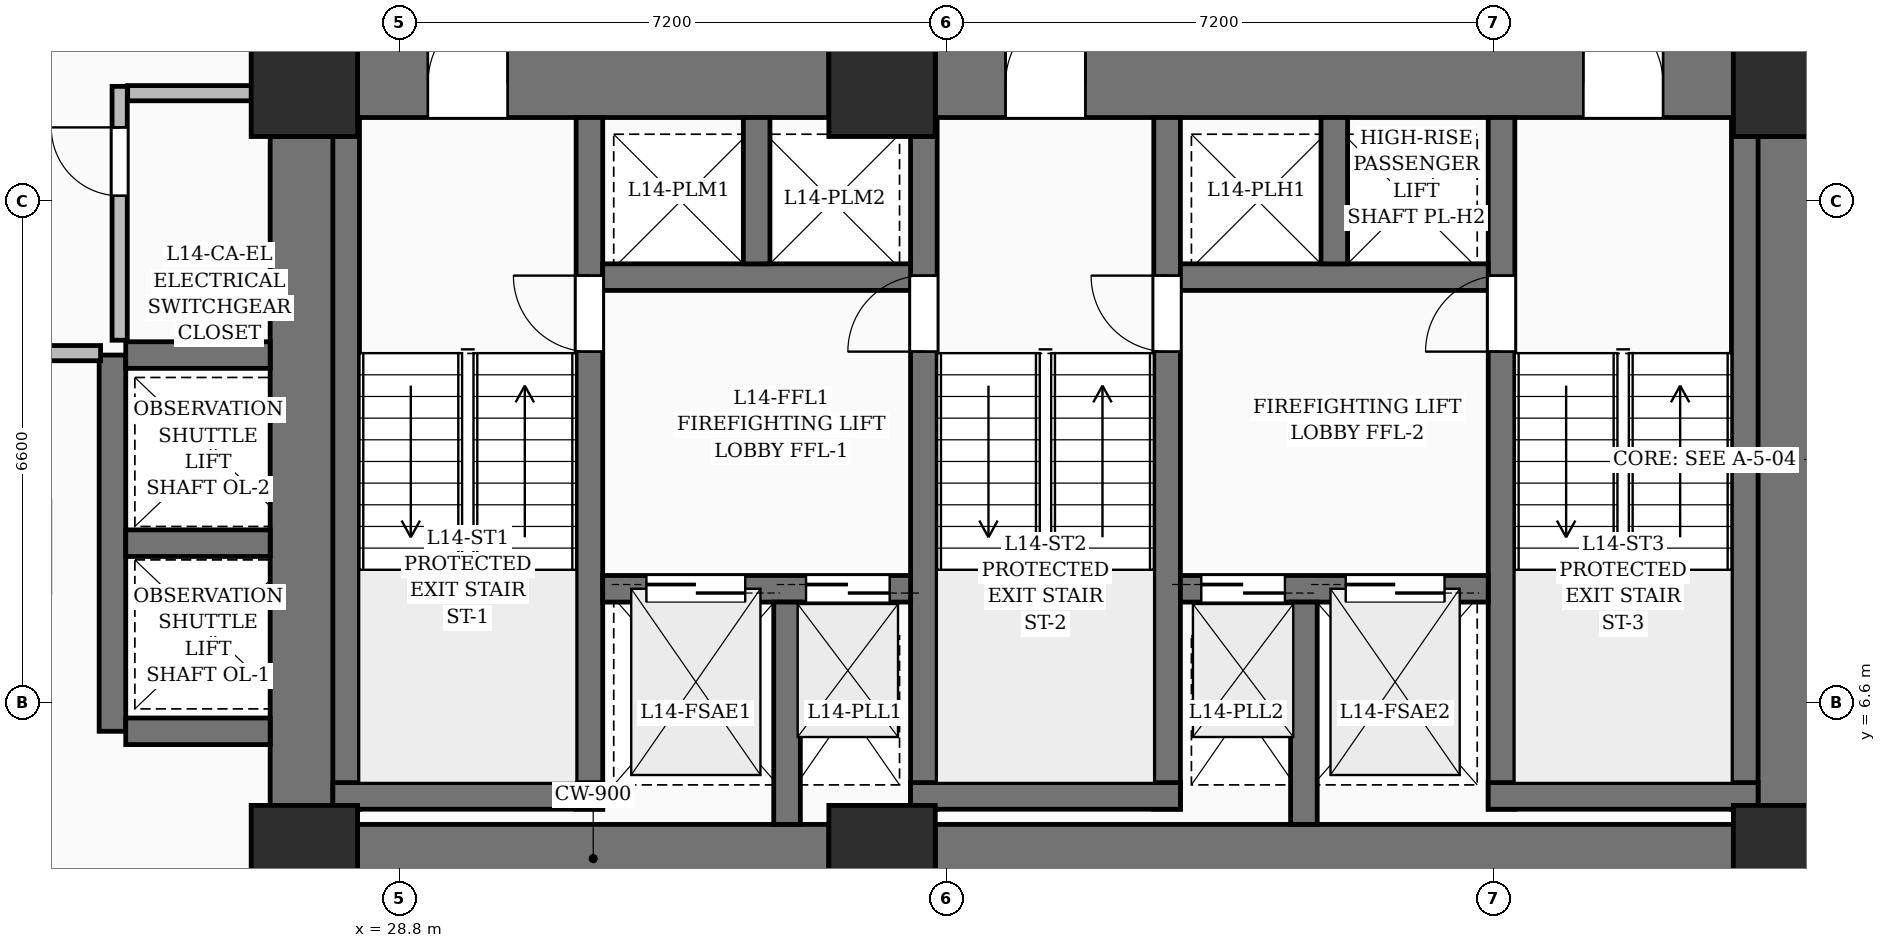
"""IFC4 building model, lengths in metres.
Left out: names, types, materials, properties, quantities, classifications, styles, units other than length and angle.
Written with IfcOpenShell. Run it as: python <this file> out.ifc"""

import sys

from ifc_helpers import new_model, si_unit, direction, frame, frame_2d, origin, origin_2d, place, context, subcontext, project, spatial, rectangle, extrude, element, fill, save


model = new_model("IFC4")
c1 = context("Model", 3, precision=1e-05, world=origin(), true_north=direction((0.0, 1.0)))
c2 = subcontext(c1, "Body", "Model", "MODEL_VIEW")
j1 = project(units=[si_unit("LENGTHUNIT", "METRE"), si_unit("PLANEANGLEUNIT", "RADIAN")], contexts=[c1])
p1 = place(None, origin())
s1 = spatial("IfcSite", under=j1, at=p1, CompositionType="ELEMENT")
p2 = place(p1, origin())
s2 = spatial("IfcBuilding", under=s1, at=p2, CompositionType="ELEMENT")
p3 = place(p2, frame((0.0, 0.0, 60.6)))
s3 = spatial("IfcBuildingStorey", under=s2, at=p3, CompositionType="ELEMENT", Elevation=60.6)
for number, where, z_axis, x_axis in (
    (1, (27.55, 4.55, 0.0), (0.0, 0.0, 1.0), (1.0, 0.0, 0.0)),
    (2, (35.15, 4.55, 0.0), (0.0, 0.0, 1.0), (1.0, 0.0, 0.0)),
    (3, (47.05, 4.55, 0.0), (0.0, 0.0, 1.0), (1.0, 0.0, 0.0)),
    (4, (27.55, 14.75, 0.0), (0.0, 0.0, 1.0), (1.0, 0.0, 0.0)),
    (5, (35.15, 14.75, 0.0), (0.0, 0.0, 1.0), (1.0, 0.0, 0.0)),
    (6, (47.05, 14.75, 0.0), (0.0, 0.0, 1.0), (1.0, 0.0, 0.0)),
):
    element("IfcColumn", number, at=place(p3, frame(where, z_axis=z_axis, x_axis=x_axis)), inside=s3, PredefinedType="COLUMN", context=c2, shape_type="SweptSolid", body=[
        extrude(rectangle(XDim=1.4, YDim=1.4, at=origin_2d()), origin(), (0.0, 0.0, 1.0), 3.6),
    ])
p4 = place(p3, frame((28.25, 4.55, 0.0), z_axis=(0.0, 0.0, 1.0), x_axis=(1.0, 0.0, 0.0)))
e7 = element("IfcWall", 7, at=p4, inside=s3, PredefinedType="SHEAR", context=c2, shape_type="SweptSolid", body=[
    extrude(rectangle(XDim=6.2, YDim=0.9, at=frame_2d((3.1, 0.0))), origin(), (0.0, 0.0, 1.0), 3.6),
])
p5 = place(p3, frame((35.85, 4.55, 0.0), z_axis=(0.0, 0.0, 1.0), x_axis=(1.0, 0.0, 0.0)))
e8 = element("IfcWall", 8, at=p5, inside=s3, PredefinedType="SHEAR", context=c2, shape_type="SweptSolid", body=[
    extrude(rectangle(XDim=10.5, YDim=0.9, at=frame_2d((5.25, 0.0))), origin(), (0.0, 0.0, 1.0), 3.6),
])
p6 = place(p3, frame((28.25, 14.75, 0.0), z_axis=(0.0, 0.0, 1.0), x_axis=(1.0, 0.0, 0.0)))
e9 = element("IfcWall", 9, at=p6, inside=s3, PredefinedType="SHEAR", context=c2, shape_type="SweptSolid", body=[
    extrude(rectangle(XDim=6.2, YDim=0.9, at=frame_2d((3.1, 0.0))), origin(), (0.0, 0.0, 1.0), 3.6),
])
p7 = place(p6, frame((0.925, 0.0, 0.0)))
e10 = element("IfcOpeningElement", 10, at=p7, cuts=e9, PredefinedType="OPENING", context=c2, shape_type="SweptSolid", body=[
    extrude(rectangle(XDim=1.05, YDim=2.15, at=frame_2d((0.525, 1.075))), frame((0.0, 0.46, 0.0), z_axis=(0.0, -1.0, 0.0), x_axis=(1.0, 0.0, 0.0)), (0.0, 0.0, 1.0), 0.92),
])
p8 = place(p3, frame((35.85, 14.75, 0.0), z_axis=(0.0, 0.0, 1.0), x_axis=(1.0, 0.0, 0.0)))
e11 = element("IfcWall", 11, at=p8, inside=s3, PredefinedType="SHEAR", context=c2, shape_type="SweptSolid", body=[
    extrude(rectangle(XDim=10.5, YDim=0.9, at=frame_2d((5.25, 0.0))), origin(), (0.0, 0.0, 1.0), 3.6),
])
p9 = place(p8, frame((0.925, 0.0, 0.0)))
e12 = element("IfcOpeningElement", 12, at=p9, cuts=e11, PredefinedType="OPENING", context=c2, shape_type="SweptSolid", body=[
    extrude(rectangle(XDim=1.05, YDim=2.15, at=frame_2d((0.525, 1.075))), frame((0.0, 0.46, 0.0), z_axis=(0.0, -1.0, 0.0), x_axis=(1.0, 0.0, 0.0)), (0.0, 0.0, 1.0), 0.92),
])
p10 = place(p8, frame((8.525, 0.0, 0.0)))
e13 = element("IfcOpeningElement", 13, at=p10, cuts=e11, PredefinedType="OPENING", context=c2, shape_type="SweptSolid", body=[
    extrude(rectangle(XDim=1.05, YDim=2.15, at=frame_2d((0.525, 1.075))), frame((0.0, 0.46, 0.0), z_axis=(0.0, -1.0, 0.0), x_axis=(1.0, 0.0, 0.0)), (0.0, 0.0, 1.0), 0.92),
])
for number, where, z_axis, x_axis in (
    (14, (27.55, 5.25, 0.0), (0.0, 0.0, 1.0), (0.0, 1.0, 0.0)),
    (15, (47.05, 5.25, 0.0), (0.0, 0.0, 1.0), (0.0, 1.0, 0.0)),
):
    element("IfcWall", number, at=place(p3, frame(where, z_axis=z_axis, x_axis=x_axis)), inside=s3, PredefinedType="SHEAR", context=c2, shape_type="SweptSolid", body=[
        extrude(rectangle(XDim=8.8, YDim=0.9, at=frame_2d((4.4, 0.0))), origin(), (0.0, 0.0, 1.0), 3.6),
    ])
p11 = place(p3, frame((28.1, 5.2, 0.0), z_axis=(0.0, 0.0, 1.0), x_axis=(0.0, 1.0, 0.0)))
e16 = element("IfcWall", 16, at=p11, inside=s3, PredefinedType="SOLIDWALL", context=c2, shape_type="SweptSolid", body=[
    extrude(rectangle(XDim=9.1, YDim=0.35, at=frame_2d((4.55, 0.0))), origin(), (0.0, 0.0, 1.0), 3.6),
])
p12 = place(p3, frame((31.3, 5.2, 0.0), z_axis=(0.0, 0.0, 1.0), x_axis=(0.0, 1.0, 0.0)))
e17 = element("IfcWall", 17, at=p12, inside=s3, PredefinedType="SOLIDWALL", context=c2, shape_type="SweptSolid", body=[
    extrude(rectangle(XDim=9.1, YDim=0.35, at=frame_2d((4.55, 0.0))), origin(), (0.0, 0.0, 1.0), 3.6),
])
p13 = place(p12, frame((6.02, 0.0, 0.0)))
e18 = element("IfcOpeningElement", 18, at=p13, cuts=e17, PredefinedType="OPENING", context=c2, shape_type="SweptSolid", body=[
    extrude(rectangle(XDim=1.0, YDim=2.15, at=frame_2d((0.5, 1.075))), frame((0.0, 0.185, 0.0), z_axis=(0.0, -1.0, 0.0), x_axis=(1.0, 0.0, 0.0)), (0.0, 0.0, 1.0), 0.37),
])
p14 = place(p3, frame((27.925, 5.375, 0.0), z_axis=(0.0, 0.0, 1.0), x_axis=(1.0, 0.0, 0.0)))
e19 = element("IfcWall", 19, at=p14, inside=s3, PredefinedType="SOLIDWALL", context=c2, shape_type="SweptSolid", body=[
    extrude(rectangle(XDim=3.55, YDim=0.35, at=frame_2d((1.775, 0.0))), origin(), (0.0, 0.0, 1.0), 3.6),
])
p15 = place(p3, frame((35.7, 5.2, 0.0), z_axis=(0.0, 0.0, 1.0), x_axis=(0.0, 1.0, 0.0)))
e20 = element("IfcWall", 20, at=p15, inside=s3, PredefinedType="SOLIDWALL", context=c2, shape_type="SweptSolid", body=[
    extrude(rectangle(XDim=9.1, YDim=0.35, at=frame_2d((4.55, 0.0))), origin(), (0.0, 0.0, 1.0), 3.6),
])
p16 = place(p15, frame((6.02, 0.0, 0.0)))
e21 = element("IfcOpeningElement", 21, at=p16, cuts=e20, PredefinedType="OPENING", context=c2, shape_type="SweptSolid", body=[
    extrude(rectangle(XDim=1.0, YDim=2.15, at=frame_2d((0.5, 1.075))), frame((0.0, 0.185, 0.0), z_axis=(0.0, -1.0, 0.0), x_axis=(1.0, 0.0, 0.0)), (0.0, 0.0, 1.0), 0.37),
])
p17 = place(p3, frame((38.9, 5.2, 0.0), z_axis=(0.0, 0.0, 1.0), x_axis=(0.0, 1.0, 0.0)))
e22 = element("IfcWall", 22, at=p17, inside=s3, PredefinedType="SOLIDWALL", context=c2, shape_type="SweptSolid", body=[
    extrude(rectangle(XDim=9.1, YDim=0.35, at=frame_2d((4.55, 0.0))), origin(), (0.0, 0.0, 1.0), 3.6),
])
p18 = place(p17, frame((6.02, 0.0, 0.0)))
e23 = element("IfcOpeningElement", 23, at=p18, cuts=e22, PredefinedType="OPENING", context=c2, shape_type="SweptSolid", body=[
    extrude(rectangle(XDim=1.0, YDim=2.15, at=frame_2d((0.5, 1.075))), frame((0.0, 0.185, 0.0), z_axis=(0.0, -1.0, 0.0), x_axis=(1.0, 0.0, 0.0)), (0.0, 0.0, 1.0), 0.37),
])
p19 = place(p3, frame((35.525, 5.375, 0.0), z_axis=(0.0, 0.0, 1.0), x_axis=(1.0, 0.0, 0.0)))
e24 = element("IfcWall", 24, at=p19, inside=s3, PredefinedType="SOLIDWALL", context=c2, shape_type="SweptSolid", body=[
    extrude(rectangle(XDim=3.55, YDim=0.35, at=frame_2d((1.775, 0.0))), origin(), (0.0, 0.0, 1.0), 3.6),
])
p20 = place(p3, frame((43.3, 5.2, 0.0), z_axis=(0.0, 0.0, 1.0), x_axis=(0.0, 1.0, 0.0)))
e25 = element("IfcWall", 25, at=p20, inside=s3, PredefinedType="SOLIDWALL", context=c2, shape_type="SweptSolid", body=[
    extrude(rectangle(XDim=9.1, YDim=0.35, at=frame_2d((4.55, 0.0))), origin(), (0.0, 0.0, 1.0), 3.6),
])
p21 = place(p20, frame((6.02, 0.0, 0.0)))
e26 = element("IfcOpeningElement", 26, at=p21, cuts=e25, PredefinedType="OPENING", context=c2, shape_type="SweptSolid", body=[
    extrude(rectangle(XDim=1.0, YDim=2.15, at=frame_2d((0.5, 1.075))), frame((0.0, 0.185, 0.0), z_axis=(0.0, -1.0, 0.0), x_axis=(1.0, 0.0, 0.0)), (0.0, 0.0, 1.0), 0.37),
])
p22 = place(p3, frame((46.5, 5.2, 0.0), z_axis=(0.0, 0.0, 1.0), x_axis=(0.0, 1.0, 0.0)))
e27 = element("IfcWall", 27, at=p22, inside=s3, PredefinedType="SOLIDWALL", context=c2, shape_type="SweptSolid", body=[
    extrude(rectangle(XDim=9.1, YDim=0.35, at=frame_2d((4.55, 0.0))), origin(), (0.0, 0.0, 1.0), 3.6),
])
p23 = place(p3, frame((43.125, 5.375, 0.0), z_axis=(0.0, 0.0, 1.0), x_axis=(1.0, 0.0, 0.0)))
e28 = element("IfcWall", 28, at=p23, inside=s3, PredefinedType="SOLIDWALL", context=c2, shape_type="SweptSolid", body=[
    extrude(rectangle(XDim=3.55, YDim=0.35, at=frame_2d((1.775, 0.0))), origin(), (0.0, 0.0, 1.0), 3.6),
])
p24 = place(p3, frame((31.475, 8.1, 0.0), z_axis=(0.0, 0.0, 1.0), x_axis=(1.0, 0.0, 0.0)))
e29 = element("IfcWall", 29, at=p24, inside=s3, PredefinedType="SOLIDWALL", context=c2, shape_type="SweptSolid", body=[
    extrude(rectangle(XDim=4.05, YDim=0.35, at=frame_2d((2.025, 0.0))), origin(), (0.0, 0.0, 1.0), 3.6),
])
p25 = place(p24, frame((0.575, 0.0, 0.0)))
e30 = element("IfcOpeningElement", 30, at=p25, cuts=e29, PredefinedType="OPENING", context=c2, shape_type="SweptSolid", body=[
    extrude(rectangle(XDim=1.3, YDim=2.25, at=frame_2d((0.65, 1.125))), frame((0.0, 0.185, 0.0), z_axis=(0.0, -1.0, 0.0), x_axis=(1.0, 0.0, 0.0)), (0.0, 0.0, 1.0), 0.37),
])
p26 = place(p24, frame((2.675, 0.0, 0.0)))
e31 = element("IfcOpeningElement", 31, at=p26, cuts=e29, PredefinedType="OPENING", context=c2, shape_type="SweptSolid", body=[
    extrude(rectangle(XDim=1.1, YDim=2.2, at=frame_2d((0.55, 1.1))), frame((0.0, 0.185, 0.0), z_axis=(0.0, -1.0, 0.0), x_axis=(1.0, 0.0, 0.0)), (0.0, 0.0, 1.0), 0.37),
])
p27 = place(p3, frame((39.075, 8.1, 0.0), z_axis=(0.0, 0.0, 1.0), x_axis=(1.0, 0.0, 0.0)))
e32 = element("IfcWall", 32, at=p27, inside=s3, PredefinedType="SOLIDWALL", context=c2, shape_type="SweptSolid", body=[
    extrude(rectangle(XDim=4.05, YDim=0.35, at=frame_2d((2.025, 0.0))), origin(), (0.0, 0.0, 1.0), 3.6),
])
p28 = place(p27, frame((2.175, 0.0, 0.0)))
e33 = element("IfcOpeningElement", 33, at=p28, cuts=e32, PredefinedType="OPENING", context=c2, shape_type="SweptSolid", body=[
    extrude(rectangle(XDim=1.3, YDim=2.25, at=frame_2d((0.65, 1.125))), frame((0.0, 0.185, 0.0), z_axis=(0.0, -1.0, 0.0), x_axis=(1.0, 0.0, 0.0)), (0.0, 0.0, 1.0), 0.37),
])
p29 = place(p27, frame((0.275, 0.0, 0.0)))
e34 = element("IfcOpeningElement", 34, at=p29, cuts=e32, PredefinedType="OPENING", context=c2, shape_type="SweptSolid", body=[
    extrude(rectangle(XDim=1.1, YDim=2.2, at=frame_2d((0.55, 1.1))), frame((0.0, 0.185, 0.0), z_axis=(0.0, -1.0, 0.0), x_axis=(1.0, 0.0, 0.0)), (0.0, 0.0, 1.0), 0.37),
])
for number, where, z_axis, x_axis in (
    (35, (33.9, 5.0, 0.0), (0.0, 0.0, 1.0), (0.0, 1.0, 0.0)),
    (36, (40.7, 5.0, 0.0), (0.0, 0.0, 1.0), (0.0, 1.0, 0.0)),
):
    element("IfcWall", number, at=place(p3, frame(where, z_axis=z_axis, x_axis=x_axis)), inside=s3, PredefinedType="SOLIDWALL", context=c2, shape_type="SweptSolid", body=[
        extrude(rectangle(XDim=2.925, YDim=0.35, at=frame_2d((1.462, 0.0))), origin(), (0.0, 0.0, 1.0), 3.6),
    ])
p30 = place(p3, frame((31.475, 12.2, 0.0), z_axis=(0.0, 0.0, 1.0), x_axis=(1.0, 0.0, 0.0)))
e37 = element("IfcWall", 37, at=p30, inside=s3, PredefinedType="SOLIDWALL", context=c2, shape_type="SweptSolid", body=[
    extrude(rectangle(XDim=4.05, YDim=0.35, at=frame_2d((2.025, 0.0))), origin(), (0.0, 0.0, 1.0), 3.6),
])
p31 = place(p3, frame((33.5, 12.375, 0.0), z_axis=(0.0, 0.0, 1.0), x_axis=(0.0, 1.0, 0.0)))
e38 = element("IfcWall", 38, at=p31, inside=s3, PredefinedType="SOLIDWALL", context=c2, shape_type="SweptSolid", body=[
    extrude(rectangle(XDim=1.925, YDim=0.35, at=frame_2d((0.962, 0.0))), origin(), (0.0, 0.0, 1.0), 3.6),
])
p32 = place(p3, frame((39.075, 12.2, 0.0), z_axis=(0.0, 0.0, 1.0), x_axis=(1.0, 0.0, 0.0)))
e39 = element("IfcWall", 39, at=p32, inside=s3, PredefinedType="SOLIDWALL", context=c2, shape_type="SweptSolid", body=[
    extrude(rectangle(XDim=4.05, YDim=0.35, at=frame_2d((2.025, 0.0))), origin(), (0.0, 0.0, 1.0), 3.6),
])
p33 = place(p3, frame((41.1, 12.375, 0.0), z_axis=(0.0, 0.0, 1.0), x_axis=(0.0, 1.0, 0.0)))
e40 = element("IfcWall", 40, at=p33, inside=s3, PredefinedType="SOLIDWALL", context=c2, shape_type="SweptSolid", body=[
    extrude(rectangle(XDim=1.925, YDim=0.35, at=frame_2d((0.962, 0.0))), origin(), (0.0, 0.0, 1.0), 3.6),
])
p34 = place(p3, frame((25.025, 6.225, 0.0), z_axis=(0.0, 0.0, 1.0), x_axis=(0.0, 1.0, 0.0)))
e41 = element("IfcWall", 41, at=p34, inside=s3, PredefinedType="SOLIDWALL", context=c2, shape_type="SweptSolid", body=[
    extrude(rectangle(XDim=4.95, YDim=0.35, at=frame_2d((2.475, 0.0))), origin(), (0.0, 0.0, 1.0), 3.6),
])
for number, where, z_axis, x_axis in (
    (42, (25.2, 6.225, 0.0), (0.0, 0.0, 1.0), (1.0, 0.0, 0.0)),
    (43, (25.2, 8.7, 0.0), (0.0, 0.0, 1.0), (1.0, 0.0, 0.0)),
    (44, (25.2, 11.175, 0.0), (0.0, 0.0, 1.0), (1.0, 0.0, 0.0)),
):
    element("IfcWall", number, at=place(p3, frame(where, z_axis=z_axis, x_axis=x_axis)), inside=s3, PredefinedType="SOLIDWALL", context=c2, shape_type="SweptSolid", body=[
        extrude(rectangle(XDim=1.9, YDim=0.35, at=frame_2d((0.95, 0.0))), origin(), (0.0, 0.0, 1.0), 3.6),
    ])
p35 = place(p3, frame((25.12, 11.37, 0.0), z_axis=(0.0, 0.0, 1.0), x_axis=(0.0, 1.0, 0.0)))
e45 = element("IfcWall", 45, at=p35, inside=s3, PredefinedType="PARTITIONING", context=c2, shape_type="SweptSolid", body=[
    extrude(rectangle(XDim=3.34, YDim=0.2, at=frame_2d((1.67, 0.0))), origin(), (0.0, 0.0, 1.0), 3.35),
])
p36 = place(p35, frame((1.9, 0.0, 0.0)))
e46 = element("IfcOpeningElement", 46, at=p36, cuts=e45, PredefinedType="OPENING", context=c2, shape_type="SweptSolid", body=[
    extrude(rectangle(XDim=0.9, YDim=2.1, at=frame_2d((0.45, 1.05))), frame((0.0, 0.11, 0.0), z_axis=(0.0, -1.0, 0.0), x_axis=(1.0, 0.0, 0.0)), (0.0, 0.0, 1.0), 0.22),
])
p37 = place(p3, frame((25.225, 14.62, 0.0), z_axis=(0.0, 0.0, 1.0), x_axis=(1.0, 0.0, 0.0)))
e47 = element("IfcWall", 47, at=p37, inside=s3, PredefinedType="PARTITIONING", context=c2, shape_type="SweptSolid", body=[
    extrude(rectangle(XDim=1.86, YDim=0.2, at=frame_2d((0.93, 0.0))), origin(), (0.0, 0.0, 1.0), 3.35),
])
p38 = place(p3, frame((21.4, 11.2, 0.0), z_axis=(0.0, 0.0, 1.0), x_axis=(1.0, 0.0, 0.0)))
e48 = element("IfcWall", 48, at=p38, inside=s3, PredefinedType="PARTITIONING", context=c2, shape_type="SweptSolid", body=[
    extrude(rectangle(XDim=3.469, YDim=0.2, at=frame_2d((1.735, 0.0))), origin(), (0.0, 0.0, 1.0), 2.712),
])
p39 = place(p38, frame((0.975, 0.0, 0.0)))
e49 = element("IfcOpeningElement", 49, at=p39, cuts=e48, PredefinedType="OPENING", context=c2, shape_type="SweptSolid", body=[
    extrude(rectangle(XDim=1.6, YDim=2.3, at=frame_2d((0.8, 1.15))), frame((0.0, 0.11, 0.0), z_axis=(0.0, -1.0, 0.0), x_axis=(1.0, 0.0, 0.0)), (0.0, 0.0, 1.0), 0.22),
])
p40 = place(p7, origin())
e50 = element("IfcDoor", 50, at=p40, inside=s3, OperationType="SINGLE_SWING_RIGHT", PredefinedType="DOOR", context=c2, shape_type="SweptSolid", body=[
    extrude(rectangle(XDim=1.05, YDim=2.15, at=frame_2d((0.525, 1.075))), frame((0.0, 0.025, 0.0), z_axis=(0.0, -1.0, 0.0), x_axis=(1.0, 0.0, 0.0)), (0.0, 0.0, 1.0), 0.05),
])
fill(e10, e50)
p41 = place(p9, origin())
e51 = element("IfcDoor", 51, at=p41, inside=s3, OperationType="SINGLE_SWING_RIGHT", PredefinedType="DOOR", context=c2, shape_type="SweptSolid", body=[
    extrude(rectangle(XDim=1.05, YDim=2.15, at=frame_2d((0.525, 1.075))), frame((0.0, 0.025, 0.0), z_axis=(0.0, -1.0, 0.0), x_axis=(1.0, 0.0, 0.0)), (0.0, 0.0, 1.0), 0.05),
])
fill(e12, e51)
p42 = place(p10, origin())
e52 = element("IfcDoor", 52, at=p42, inside=s3, OperationType="SINGLE_SWING_LEFT", PredefinedType="DOOR", context=c2, shape_type="SweptSolid", body=[
    extrude(rectangle(XDim=1.05, YDim=2.15, at=frame_2d((0.525, 1.075))), frame((0.0, 0.025, 0.0), z_axis=(0.0, -1.0, 0.0), x_axis=(1.0, 0.0, 0.0)), (0.0, 0.0, 1.0), 0.05),
])
fill(e13, e52)
p43 = place(p13, origin())
e53 = element("IfcDoor", 53, at=p43, inside=s3, OperationType="SINGLE_SWING_RIGHT", PredefinedType="DOOR", context=c2, shape_type="SweptSolid", body=[
    extrude(rectangle(XDim=1.0, YDim=2.15, at=frame_2d((0.5, 1.075))), frame((0.0, 0.025, 0.0), z_axis=(0.0, -1.0, 0.0), x_axis=(1.0, 0.0, 0.0)), (0.0, 0.0, 1.0), 0.05),
])
fill(e18, e53)
p44 = place(p16, origin())
e54 = element("IfcDoor", 54, at=p44, inside=s3, OperationType="SINGLE_SWING_LEFT", PredefinedType="DOOR", context=c2, shape_type="SweptSolid", body=[
    extrude(rectangle(XDim=1.0, YDim=2.15, at=frame_2d((0.5, 1.075))), frame((0.0, 0.025, 0.0), z_axis=(0.0, -1.0, 0.0), x_axis=(1.0, 0.0, 0.0)), (0.0, 0.0, 1.0), 0.05),
])
fill(e21, e54)
p45 = place(p18, origin())
e55 = element("IfcDoor", 55, at=p45, inside=s3, OperationType="SINGLE_SWING_RIGHT", PredefinedType="DOOR", context=c2, shape_type="SweptSolid", body=[
    extrude(rectangle(XDim=1.0, YDim=2.15, at=frame_2d((0.5, 1.075))), frame((0.0, 0.025, 0.0), z_axis=(0.0, -1.0, 0.0), x_axis=(1.0, 0.0, 0.0)), (0.0, 0.0, 1.0), 0.05),
])
fill(e23, e55)
p46 = place(p21, origin())
e56 = element("IfcDoor", 56, at=p46, inside=s3, OperationType="SINGLE_SWING_LEFT", PredefinedType="DOOR", context=c2, shape_type="SweptSolid", body=[
    extrude(rectangle(XDim=1.0, YDim=2.15, at=frame_2d((0.5, 1.075))), frame((0.0, 0.025, 0.0), z_axis=(0.0, -1.0, 0.0), x_axis=(1.0, 0.0, 0.0)), (0.0, 0.0, 1.0), 0.05),
])
fill(e26, e56)
p47 = place(p25, origin())
e57 = element("IfcDoor", 57, at=p47, inside=s3, OperationType="DOUBLE_DOOR_SLIDING", PredefinedType="DOOR", context=c2, shape_type="SweptSolid", body=[
    extrude(rectangle(XDim=1.3, YDim=2.25, at=frame_2d((0.65, 1.125))), frame((0.0, 0.025, 0.0), z_axis=(0.0, -1.0, 0.0), x_axis=(1.0, 0.0, 0.0)), (0.0, 0.0, 1.0), 0.05),
])
fill(e30, e57)
p48 = place(p28, origin())
e58 = element("IfcDoor", 58, at=p48, inside=s3, OperationType="DOUBLE_DOOR_SLIDING", PredefinedType="DOOR", context=c2, shape_type="SweptSolid", body=[
    extrude(rectangle(XDim=1.3, YDim=2.25, at=frame_2d((0.65, 1.125))), frame((0.0, 0.025, 0.0), z_axis=(0.0, -1.0, 0.0), x_axis=(1.0, 0.0, 0.0)), (0.0, 0.0, 1.0), 0.05),
])
fill(e33, e58)
p49 = place(p26, origin())
e59 = element("IfcDoor", 59, at=p49, inside=s3, OperationType="DOUBLE_DOOR_SLIDING", PredefinedType="DOOR", context=c2, shape_type="SweptSolid", body=[
    extrude(rectangle(XDim=1.1, YDim=2.2, at=frame_2d((0.55, 1.1))), frame((0.0, 0.025, 0.0), z_axis=(0.0, -1.0, 0.0), x_axis=(1.0, 0.0, 0.0)), (0.0, 0.0, 1.0), 0.05),
])
fill(e31, e59)
p50 = place(p29, origin())
e60 = element("IfcDoor", 60, at=p50, inside=s3, OperationType="DOUBLE_DOOR_SLIDING", PredefinedType="DOOR", context=c2, shape_type="SweptSolid", body=[
    extrude(rectangle(XDim=1.1, YDim=2.2, at=frame_2d((0.55, 1.1))), frame((0.0, 0.025, 0.0), z_axis=(0.0, -1.0, 0.0), x_axis=(1.0, 0.0, 0.0)), (0.0, 0.0, 1.0), 0.05),
])
fill(e34, e60)
p51 = place(p36, origin())
e61 = element("IfcDoor", 61, at=p51, inside=s3, OperationType="SINGLE_SWING_RIGHT", PredefinedType="DOOR", context=c2, shape_type="SweptSolid", body=[
    extrude(rectangle(XDim=0.9, YDim=2.1, at=frame_2d((0.45, 1.05))), frame((0.0, 0.025, 0.0), z_axis=(0.0, -1.0, 0.0), x_axis=(1.0, 0.0, 0.0)), (0.0, 0.0, 1.0), 0.05),
])
fill(e46, e61)
save(model, sys.argv[1])
